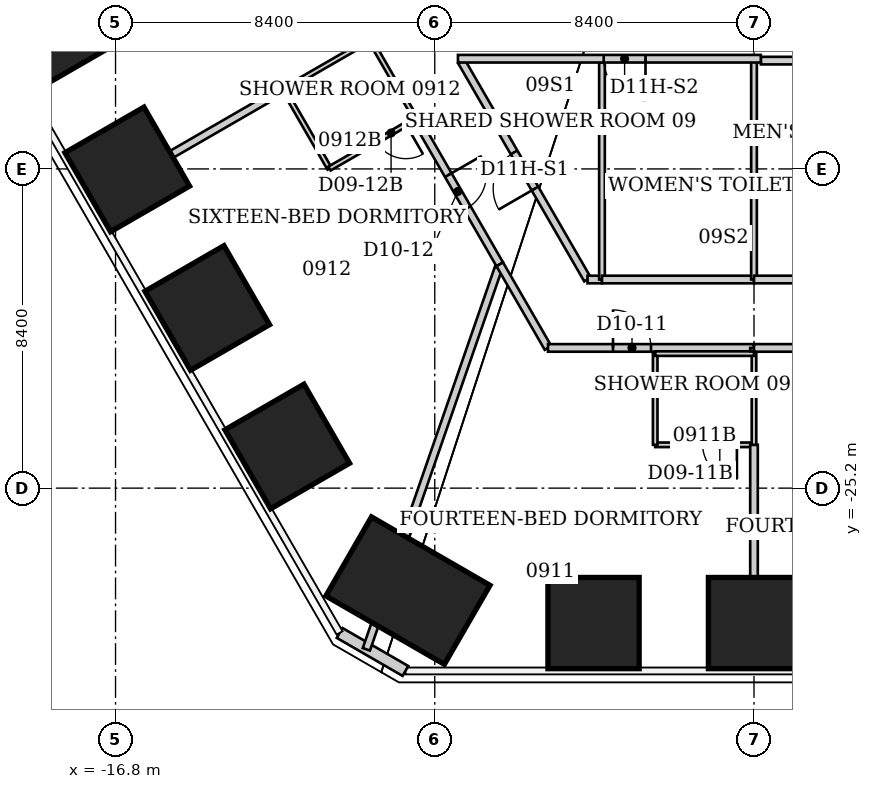
"""IFC4 building model, lengths in metres.
Left out: names, types, materials, properties, quantities, classifications, styles, units other than length and angle.
Written with IfcOpenShell. Run it as: python <this file> out.ifc"""

import sys

from ifc_helpers import new_model, si_unit, direction, frame, frame_2d, origin, origin_2d, place, context, subcontext, project, spatial, rectangle, extrude, element, fill, save


model = new_model("IFC4")
c1 = context("Model", 3, precision=1e-05, world=origin(), true_north=direction((0.0, 1.0)))
c2 = subcontext(c1, "Body", "Model", "MODEL_VIEW")
j1 = project(units=[si_unit("LENGTHUNIT", "METRE"), si_unit("PLANEANGLEUNIT", "RADIAN")], contexts=[c1])
p1 = place(None, origin())
s1 = spatial("IfcSite", under=j1, at=p1, CompositionType="ELEMENT")
p2 = place(p1, origin())
s2 = spatial("IfcBuilding", under=s1, at=p2, CompositionType="ELEMENT")
p3 = place(p2, frame((0.0, 0.0, 42.0)))
s3 = spatial("IfcBuildingStorey", under=s2, at=p3, CompositionType="ELEMENT", Elevation=42.0)
for number, where, z_axis, x_axis in (
    (1, (0.0, -28.751, 0.0), (0.0, 0.0, 1.0), (0.0, -1.0, 0.0)),
    (2, (-4.222, -28.751, 0.0), (0.0, 0.0, 1.0), (0.0, -1.0, 0.0)),
):
    element("IfcColumn", number, at=place(p3, frame(where, z_axis=z_axis, x_axis=x_axis)), inside=s3, PredefinedType="COLUMN", context=c2, shape_type="SweptSolid", body=[
        extrude(rectangle(XDim=2.4, YDim=2.4, at=origin_2d()), origin(), (0.0, 0.0, 1.0), 3.8),
    ])
p4 = place(p3, frame((-9.106, -27.897, 0.0), z_axis=(0.0, 0.0, 1.0), x_axis=(-0.5, -0.866025403784, 0.0)))
e3 = element("IfcColumn", 3, at=p4, inside=s3, PredefinedType="COLUMN", context=c2, shape_type="SweptSolid", body=[
    extrude(rectangle(XDim=2.4, YDim=3.6, at=origin_2d()), origin(), (0.0, 0.0, 1.0), 3.8),
])
for number, where, z_axis, x_axis in (
    (4, (-12.282, -24.105, 0.0), (0.0, 0.0, 1.0), (-0.866, -0.5, 0.0)),
    (5, (-14.387, -20.459, 0.0), (0.0, 0.0, 1.0), (-0.866, -0.5, 0.0)),
    (6, (-16.491, -16.813, 0.0), (0.0, 0.0, 1.0), (-0.866, -0.5, 0.0)),
    (7, (-18.596, -13.167, 0.0), (0.0, 0.0, 1.0), (-0.866, -0.5, 0.0)),
):
    element("IfcColumn", number, at=place(p3, frame(where, z_axis=z_axis, x_axis=x_axis)), inside=s3, PredefinedType="COLUMN", context=c2, shape_type="SweptSolid", body=[
        extrude(rectangle(XDim=2.4, YDim=2.4, at=origin_2d()), origin(), (0.0, 0.0, 1.0), 3.8),
    ])
p5 = place(p3, frame((-9.172, -30.011, 0.0), z_axis=(0.0, 0.0, 1.0), x_axis=(-0.866010750942, 0.50002537861, 0.0)))
e8 = element("IfcWall", 8, at=p5, inside=s3, PredefinedType="SOLIDWALL", context=c2, shape_type="SweptSolid", body=[
    extrude(rectangle(XDim=2.0, YDim=0.3, at=frame_2d((1.0, 0.0))), origin(), (0.0, 0.0, 1.0), 3.64),
])
p6 = place(p3, frame((-17.356, -17.59, 0.0), z_axis=(0.0, 0.0, 1.0), x_axis=(0.865929957466, 0.500165281445, 0.0)))
e9 = element("IfcWall", 9, at=p6, inside=s3, PredefinedType="PARTITIONING", context=c2, shape_type="SweptSolid", body=[
    extrude(rectangle(XDim=5.758, YDim=0.2, at=frame_2d((2.879, 0.0))), origin(), (0.0, 0.0, 1.0), 3.64),
])
p7 = place(p3, frame((-12.37, -14.71, 0.0), z_axis=(0.0, 0.0, 1.0), x_axis=(0.499769390944, -0.866158505053, 0.0)))
e10 = element("IfcWall", 10, at=p7, inside=s3, PredefinedType="PARTITIONING", context=c2, shape_type="SweptSolid", body=[
    extrude(rectangle(XDim=2.402, YDim=0.12, at=frame_2d((1.201, 0.0))), origin(), (0.0, 0.0, 1.0), 3.64),
])
p8 = place(p3, frame((-12.37, -14.71, 0.0), z_axis=(0.0, 0.0, 1.0), x_axis=(0.866114241029, 0.499846097802, 0.0)))
e11 = element("IfcWall", 11, at=p8, inside=s3, PredefinedType="PARTITIONING", context=c2, shape_type="SweptSolid", body=[
    extrude(rectangle(XDim=2.621, YDim=0.12, at=frame_2d((1.311, 0.0))), origin(), (0.0, 0.0, 1.0), 3.64),
])
p9 = place(p3, frame((-11.17, -16.79, 0.0), z_axis=(0.0, 0.0, 1.0), x_axis=(0.866114241029, 0.499846097802, 0.0)))
e12 = element("IfcWall", 12, at=p9, inside=s3, PredefinedType="PARTITIONING", context=c2, shape_type="SweptSolid", body=[
    extrude(rectangle(XDim=2.621, YDim=0.12, at=frame_2d((1.311, 0.0))), origin(), (0.0, 0.0, 1.0), 3.64),
])
p10 = place(p9, frame((1.421, 0.0, 0.0)))
e13 = element("IfcOpeningElement", 13, at=p10, cuts=e12, PredefinedType="OPENING", context=c2, shape_type="SweptSolid", body=[
    extrude(rectangle(XDim=0.9, YDim=2.03, at=frame_2d((0.45, 1.015))), frame((0.0, 0.06, 0.0), z_axis=(0.0, -1.0, 0.0), x_axis=(1.0, 0.0, 0.0)), (0.0, 0.0, 1.0), 0.12),
])
p11 = place(p3, frame((-10.2, -29.442, 0.0), z_axis=(0.0, 0.0, 1.0), x_axis=(0.327375786306, 0.944894223996, 0.0)))
e14 = element("IfcWall", 14, at=p11, inside=s3, PredefinedType="PARTITIONING", context=c2, shape_type="SweptSolid", body=[
    extrude(rectangle(XDim=10.623, YDim=0.2, at=frame_2d((5.311, 0.0))), origin(), (0.0, 0.0, 1.0), 3.64),
])
p12 = place(p3, frame((-10.1, -13.4, 0.0), z_axis=(0.0, 0.0, 1.0), x_axis=(0.499769390944, -0.866158505053, 0.0)))
e15 = element("IfcWall", 15, at=p12, inside=s3, PredefinedType="PARTITIONING", context=c2, shape_type="SweptSolid", body=[
    extrude(rectangle(XDim=2.402, YDim=0.12, at=frame_2d((1.201, 0.0))), origin(), (0.0, 0.0, 1.0), 3.64),
])
p13 = place(p3, frame((-8.9, -15.48, 0.0), z_axis=(0.0, 0.0, 1.0), x_axis=(0.499773435832, -0.866156171159, 0.0)))
e16 = element("IfcWall", 16, at=p13, inside=s3, PredefinedType="PARTITIONING", context=c2, shape_type="SweptSolid", body=[
    extrude(rectangle(XDim=4.422, YDim=0.2, at=frame_2d((2.211, 0.0))), origin(), (0.0, 0.0, 1.0), 3.64),
])
p14 = place(p13, frame((1.711, 0.0, 0.0)))
e17 = element("IfcOpeningElement", 17, at=p14, cuts=e16, PredefinedType="OPENING", context=c2, shape_type="SweptSolid", body=[
    extrude(rectangle(XDim=1.0, YDim=2.13, at=frame_2d((0.5, 1.065))), frame((0.0, 0.1, 0.0), z_axis=(0.0, -1.0, 0.0), x_axis=(1.0, 0.0, 0.0)), (0.0, 0.0, 1.0), 0.2),
])
p15 = place(p3, frame((-6.69, -19.31, 0.0), z_axis=(0.0, 0.0, 1.0), x_axis=(0.499963722229, -0.866046347752, 0.0)))
e18 = element("IfcWall", 18, at=p15, inside=s3, PredefinedType="PARTITIONING", context=c2, shape_type="SweptSolid", body=[
    extrude(rectangle(XDim=2.54, YDim=0.2, at=frame_2d((1.27, 0.0))), origin(), (0.0, 0.0, 1.0), 3.64),
])
p16 = place(p3, frame((-5.42, -21.51, 0.0), z_axis=(0.0, 0.0, 1.0), x_axis=(1.0, 0.0, 0.0)))
e19 = element("IfcWall", 19, at=p16, inside=s3, PredefinedType="PARTITIONING", context=c2, shape_type="SweptSolid", body=[
    extrude(rectangle(XDim=5.42, YDim=0.2, at=frame_2d((2.71, 0.0))), origin(), (0.0, 0.0, 1.0), 3.64),
])
p17 = place(p16, frame((1.71, 0.0, 0.0)))
e20 = element("IfcOpeningElement", 20, at=p17, cuts=e19, PredefinedType="OPENING", context=c2, shape_type="SweptSolid", body=[
    extrude(rectangle(XDim=1.0, YDim=2.13, at=frame_2d((0.5, 1.065))), frame((0.0, 0.1, 0.0), z_axis=(0.0, -1.0, 0.0), x_axis=(1.0, 0.0, 0.0)), (0.0, 0.0, 1.0), 0.2),
])
p18 = place(p3, frame((-4.38, -19.71, 0.0), z_axis=(0.0, 0.0, 1.0), x_axis=(-0.500523653757, 0.865722860984, 0.0)))
e21 = element("IfcWall", 21, at=p18, inside=s3, PredefinedType="PARTITIONING", context=c2, shape_type="SweptSolid", body=[
    extrude(rectangle(XDim=6.628, YDim=0.2, at=frame_2d((3.314, 0.0))), origin(), (0.0, 0.0, 1.0), 3.64),
])
p19 = place(p18, frame((2.764, 0.0, 0.0)))
e22 = element("IfcOpeningElement", 22, at=p19, cuts=e21, PredefinedType="OPENING", context=c2, shape_type="SweptSolid", body=[
    extrude(rectangle(XDim=1.1, YDim=2.2, at=frame_2d((0.55, 1.1))), frame((0.0, 0.1, 0.0), z_axis=(0.0, -1.0, 0.0), x_axis=(1.0, 0.0, 0.0)), (0.0, 0.0, 1.0), 0.2),
])
p20 = place(p3, frame((-4.0, -19.71, 0.0), z_axis=(0.0, 0.0, 1.0), x_axis=(-1.0, 0.0, 0.0)))
e23 = element("IfcWall", 23, at=p20, inside=s3, PredefinedType="PARTITIONING", context=c2, shape_type="SweptSolid", body=[
    extrude(rectangle(XDim=0.38, YDim=0.2, at=frame_2d((0.19, 0.0))), origin(), (0.0, 0.0, 1.0), 3.64),
])
p21 = place(p3, frame((-4.0, -14.0, 0.0), z_axis=(0.0, 0.0, 1.0), x_axis=(0.0, -1.0, 0.0)))
e24 = element("IfcWall", 24, at=p21, inside=s3, PredefinedType="PARTITIONING", context=c2, shape_type="SweptSolid", body=[
    extrude(rectangle(XDim=5.71, YDim=0.15, at=frame_2d((2.855, 0.0))), origin(), (0.0, 0.0, 1.0), 3.64),
])
p22 = place(p3, frame((-2.6, -24.06, 0.0), z_axis=(0.0, 0.0, 1.0), x_axis=(1.0, 0.0, 0.0)))
e25 = element("IfcWall", 25, at=p22, inside=s3, PredefinedType="PARTITIONING", context=c2, shape_type="SweptSolid", body=[
    extrude(rectangle(XDim=2.6, YDim=0.12, at=frame_2d((1.3, 0.0))), origin(), (0.0, 0.0, 1.0), 3.64),
])
p23 = place(p22, frame((1.25, 0.0, 0.0)))
e26 = element("IfcOpeningElement", 26, at=p23, cuts=e25, PredefinedType="OPENING", context=c2, shape_type="SweptSolid", body=[
    extrude(rectangle(XDim=0.9, YDim=2.03, at=frame_2d((0.45, 1.015))), frame((0.0, 0.06, 0.0), z_axis=(0.0, -1.0, 0.0), x_axis=(1.0, 0.0, 0.0)), (0.0, 0.0, 1.0), 0.12),
])
p24 = place(p3, frame((-2.6, -21.66, 0.0), z_axis=(0.0, 0.0, 1.0), x_axis=(0.0, -1.0, 0.0)))
e27 = element("IfcWall", 27, at=p24, inside=s3, PredefinedType="PARTITIONING", context=c2, shape_type="SweptSolid", body=[
    extrude(rectangle(XDim=2.4, YDim=0.12, at=frame_2d((1.2, 0.0))), origin(), (0.0, 0.0, 1.0), 3.64),
])
p25 = place(p3, frame((0.0, -29.89, 0.0), z_axis=(0.0, 0.0, 1.0), x_axis=(0.0, 1.0, 0.0)))
e28 = element("IfcWall", 28, at=p25, inside=s3, PredefinedType="PARTITIONING", context=c2, shape_type="SweptSolid", body=[
    extrude(rectangle(XDim=5.83, YDim=0.2, at=frame_2d((2.915, 0.0))), origin(), (0.0, 0.0, 1.0), 2.86),
])
p26 = place(p3, frame((0.0, -24.06, 0.0), z_axis=(0.0, 0.0, 1.0), x_axis=(0.0, 1.0, 0.0)))
e29 = element("IfcWall", 29, at=p26, inside=s3, PredefinedType="PARTITIONING", context=c2, shape_type="SweptSolid", body=[
    extrude(rectangle(XDim=2.4, YDim=0.12, at=frame_2d((1.2, 0.0))), origin(), (0.0, 0.0, 1.0), 2.86),
])
p27 = place(p3, frame((0.0, -21.66, 0.0), z_axis=(0.0, 0.0, 1.0), x_axis=(-1.0, 0.0, 0.0)))
e30 = element("IfcWall", 30, at=p27, inside=s3, PredefinedType="PARTITIONING", context=c2, shape_type="SweptSolid", body=[
    extrude(rectangle(XDim=2.6, YDim=0.12, at=frame_2d((1.3, 0.0))), origin(), (0.0, 0.0, 1.0), 3.64),
])
p28 = place(p3, frame((0.0, -21.6, 0.0), z_axis=(0.0, 0.0, 1.0), x_axis=(0.0, 1.0, 0.0)))
e31 = element("IfcWall", 31, at=p28, inside=s3, PredefinedType="PARTITIONING", context=c2, shape_type="SweptSolid", body=[
    extrude(rectangle(XDim=0.09, YDim=0.2, at=frame_2d((0.045, 0.0))), origin(), (0.0, 0.0, 1.0), 3.64),
])
p29 = place(p3, frame((0.0, -21.51, 0.0), z_axis=(0.0, 0.0, 1.0), x_axis=(1.0, 0.0, 0.0)))
e32 = element("IfcWall", 32, at=p29, inside=s3, PredefinedType="PARTITIONING", context=c2, shape_type="SweptSolid", body=[
    extrude(rectangle(XDim=5.42, YDim=0.2, at=frame_2d((2.71, 0.0))), origin(), (0.0, 0.0, 1.0), 3.64),
])
p30 = place(p29, frame((2.21, 0.0, 0.0)))
e33 = element("IfcOpeningElement", 33, at=p30, cuts=e32, PredefinedType="OPENING", context=c2, shape_type="SweptSolid", body=[
    extrude(rectangle(XDim=1.0, YDim=2.13, at=frame_2d((0.5, 1.065))), frame((0.0, 0.1, 0.0), z_axis=(0.0, -1.0, 0.0), x_axis=(1.0, 0.0, 0.0)), (0.0, 0.0, 1.0), 0.2),
])
p31 = place(p3, frame((0.0, -19.71, 0.0), z_axis=(0.0, 0.0, 1.0), x_axis=(-1.0, 0.0, 0.0)))
e34 = element("IfcWall", 34, at=p31, inside=s3, PredefinedType="PARTITIONING", context=c2, shape_type="SweptSolid", body=[
    extrude(rectangle(XDim=4.0, YDim=0.2, at=frame_2d((2.0, 0.0))), origin(), (0.0, 0.0, 1.0), 3.64),
])
p32 = place(p3, frame((0.0, -13.95, 0.0), z_axis=(0.0, 0.0, 1.0), x_axis=(0.0, -1.0, 0.0)))
e35 = element("IfcWall", 35, at=p32, inside=s3, PredefinedType="PARTITIONING", context=c2, shape_type="SweptSolid", body=[
    extrude(rectangle(XDim=5.76, YDim=0.15, at=frame_2d((2.88, 0.0))), origin(), (0.0, 0.0, 1.0), 2.86),
])
p33 = place(p3, frame((0.18, -13.95, 0.0), z_axis=(0.0, 0.0, 1.0), x_axis=(1.0, 0.0, 0.0)))
e36 = element("IfcWall", 36, at=p33, inside=s3, PredefinedType="PARTITIONING", context=c2, shape_type="SweptSolid", body=[
    extrude(rectangle(XDim=3.82, YDim=0.2, at=frame_2d((1.91, 0.0))), origin(), (0.0, 0.0, 1.0), 3.64),
])
p34 = place(p3, frame((0.18, -13.9, 0.0), z_axis=(0.0, 0.0, 1.0), x_axis=(-1.0, 0.0, 0.0)))
e37 = element("IfcWall", 37, at=p34, inside=s3, PredefinedType="PARTITIONING", context=c2, shape_type="SweptSolid", body=[
    extrude(rectangle(XDim=7.97, YDim=0.2, at=frame_2d((3.985, 0.0))), origin(), (0.0, 0.0, 1.0), 3.64),
])
p35 = place(p34, frame((3.035, 0.0, 0.0)))
e38 = element("IfcOpeningElement", 38, at=p35, cuts=e37, PredefinedType="OPENING", context=c2, shape_type="SweptSolid", body=[
    extrude(rectangle(XDim=1.1, YDim=2.2, at=frame_2d((0.55, 1.1))), frame((0.0, 0.1, 0.0), z_axis=(0.0, -1.0, 0.0), x_axis=(1.0, 0.0, 0.0)), (0.0, 0.0, 1.0), 0.2),
])
p36 = place(p3, frame((4.0, -19.71, 0.0), z_axis=(0.0, 0.0, 1.0), x_axis=(-1.0, 0.0, 0.0)))
e39 = element("IfcWall", 39, at=p36, inside=s3, PredefinedType="PARTITIONING", context=c2, shape_type="SweptSolid", body=[
    extrude(rectangle(XDim=4.0, YDim=0.2, at=frame_2d((2.0, 0.0))), origin(), (0.0, 0.0, 1.0), 3.64),
])
p37 = place(p36, frame((1.45, 0.0, 0.0)))
e40 = element("IfcOpeningElement", 40, at=p37, cuts=e39, PredefinedType="OPENING", context=c2, shape_type="SweptSolid", body=[
    extrude(rectangle(XDim=1.1, YDim=2.2, at=frame_2d((0.55, 1.1))), frame((0.0, 0.1, 0.0), z_axis=(0.0, -1.0, 0.0), x_axis=(1.0, 0.0, 0.0)), (0.0, 0.0, 1.0), 0.2),
])
p38 = place(p17, origin())
e41 = element("IfcDoor", 41, at=p38, inside=s3, OperationType="SINGLE_SWING_LEFT", PredefinedType="DOOR", context=c2, shape_type="SweptSolid", body=[
    extrude(rectangle(XDim=1.0, YDim=2.13, at=frame_2d((0.5, 1.065))), frame((0.0, 0.025, 0.0), z_axis=(0.0, -1.0, 0.0), x_axis=(1.0, 0.0, 0.0)), (0.0, 0.0, 1.0), 0.05),
])
fill(e20, e41)
p39 = place(p23, origin())
e42 = element("IfcDoor", 42, at=p39, inside=s3, OperationType="SINGLE_SWING_RIGHT", PredefinedType="DOOR", context=c2, shape_type="SweptSolid", body=[
    extrude(rectangle(XDim=0.9, YDim=2.03, at=frame_2d((0.45, 1.015))), frame((0.0, 0.025, 0.0), z_axis=(0.0, -1.0, 0.0), x_axis=(1.0, 0.0, 0.0)), (0.0, 0.0, 1.0), 0.05),
])
fill(e26, e42)
p40 = place(p14, origin())
e43 = element("IfcDoor", 43, at=p40, inside=s3, OperationType="SINGLE_SWING_LEFT", PredefinedType="DOOR", context=c2, shape_type="SweptSolid", body=[
    extrude(rectangle(XDim=1.0, YDim=2.13, at=frame_2d((0.5, 1.065))), frame((0.0, 0.025, 0.0), z_axis=(0.0, -1.0, 0.0), x_axis=(1.0, 0.0, 0.0)), (0.0, 0.0, 1.0), 0.05),
])
fill(e17, e43)
p41 = place(p10, origin())
e44 = element("IfcDoor", 44, at=p41, inside=s3, OperationType="SINGLE_SWING_RIGHT", PredefinedType="DOOR", context=c2, shape_type="SweptSolid", body=[
    extrude(rectangle(XDim=0.9, YDim=2.03, at=frame_2d((0.45, 1.015))), frame((0.0, 0.025, 0.0), z_axis=(0.0, -1.0, 0.0), x_axis=(1.0, 0.0, 0.0)), (0.0, 0.0, 1.0), 0.05),
])
fill(e13, e44)
p42 = place(p19, origin())
e45 = element("IfcDoor", 45, at=p42, inside=s3, OperationType="SINGLE_SWING_LEFT", PredefinedType="DOOR", context=c2, shape_type="SweptSolid", body=[
    extrude(rectangle(XDim=1.1, YDim=2.2, at=frame_2d((0.55, 1.1))), frame((0.0, 0.025, 0.0), z_axis=(0.0, -1.0, 0.0), x_axis=(1.0, 0.0, 0.0)), (0.0, 0.0, 1.0), 0.05),
])
fill(e22, e45)
p43 = place(p35, origin())
e46 = element("IfcDoor", 46, at=p43, inside=s3, OperationType="SINGLE_SWING_LEFT", PredefinedType="DOOR", context=c2, shape_type="SweptSolid", body=[
    extrude(rectangle(XDim=1.1, YDim=2.2, at=frame_2d((0.55, 1.1))), frame((0.0, 0.025, 0.0), z_axis=(0.0, -1.0, 0.0), x_axis=(1.0, 0.0, 0.0)), (0.0, 0.0, 1.0), 0.05),
])
fill(e38, e46)
save(model, sys.argv[1])
